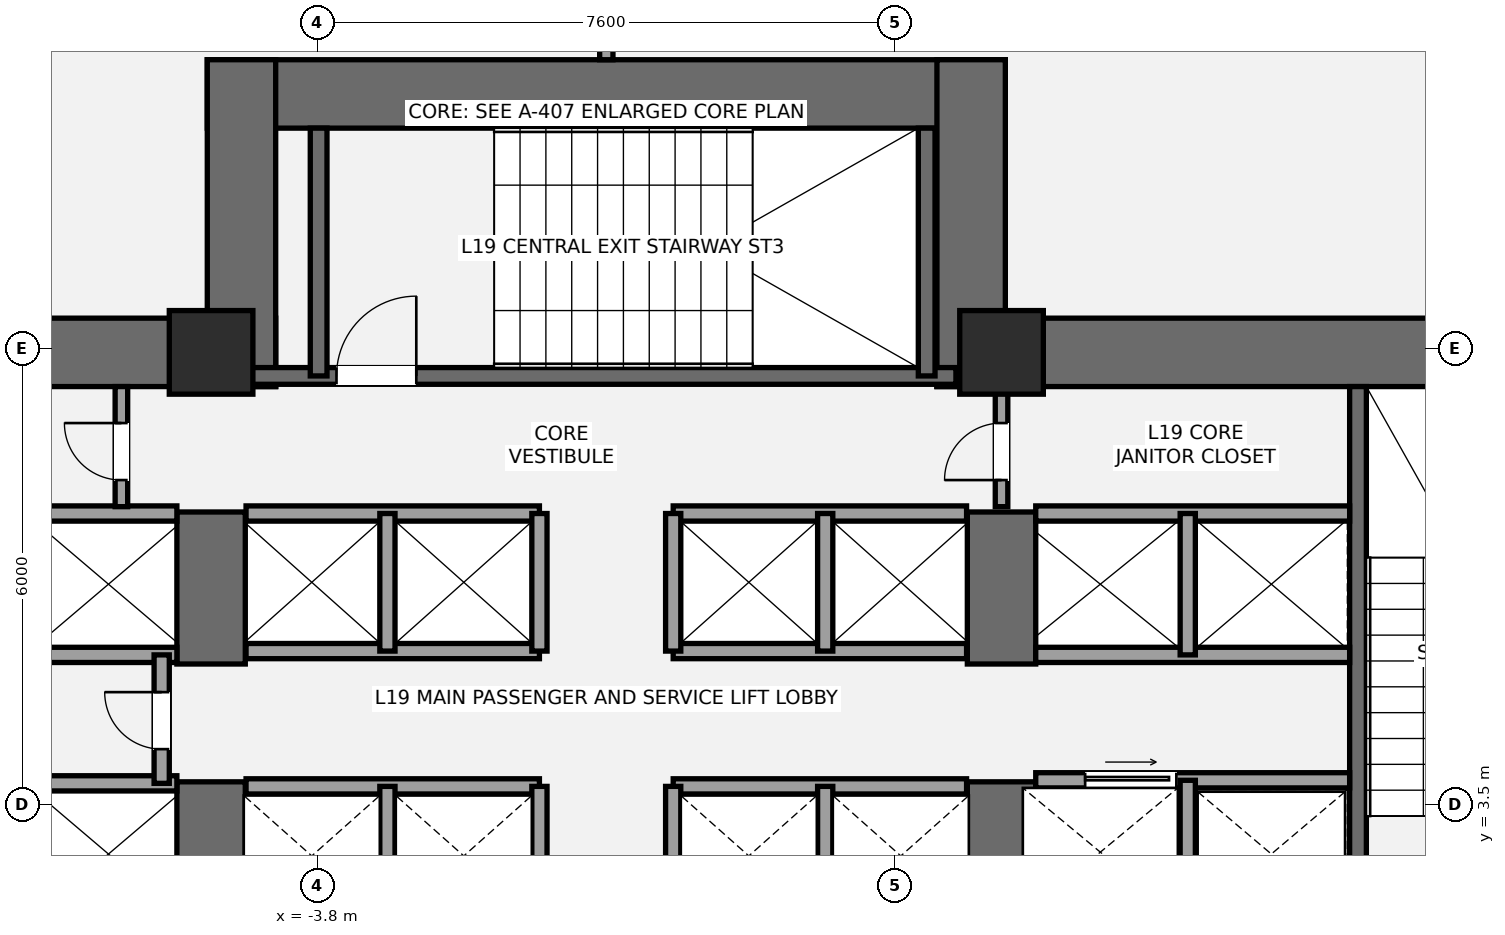
"""IFC4 building model, lengths in metres.
Left out: names, types, materials, properties, quantities, classifications, styles, units other than length and angle.
Written with IfcOpenShell. Run it as: python <this file> out.ifc"""

import sys

from ifc_helpers import new_model, si_unit, direction, frame, frame_2d, origin, origin_2d, place, context, subcontext, project, spatial, rectangle, extrude, element, fill, save


model = new_model("IFC4")
c1 = context("Model", 3, precision=1e-05, world=origin(), true_north=direction((0.0, 1.0)))
c2 = subcontext(c1, "Body", "Model", "MODEL_VIEW")
j1 = project(units=[si_unit("LENGTHUNIT", "METRE"), si_unit("PLANEANGLEUNIT", "RADIAN")], contexts=[c1])
p1 = place(None, origin())
s1 = spatial("IfcSite", under=j1, at=p1, CompositionType="ELEMENT")
p2 = place(p1, origin())
s2 = spatial("IfcBuilding", under=s1, at=p2, CompositionType="ELEMENT")
p3 = place(p2, frame((0.0, 0.0, 73.8)))
s3 = spatial("IfcBuildingStorey", under=s2, at=p3, CompositionType="ELEMENT", Elevation=73.8)
p4 = place(p3, frame((-14.05, 9.45, 0.0), z_axis=(0.0, 0.0, 1.0), x_axis=(1.0, 0.0, 0.0)))
e1 = element("IfcWall", 1, at=p4, inside=s3, PredefinedType="SHEAR", context=c2, shape_type="SweptSolid", body=[
    extrude(rectangle(XDim=9.7, YDim=0.9, at=frame_2d((4.85, 0.0))), origin(), (0.0, 0.0, 1.0), 3.6),
])
p5 = place(p3, frame((-5.2, 0.95, 0.0), z_axis=(0.0, 0.0, 1.0), x_axis=(0.0, 1.0, 0.0)))
e2 = element("IfcWall", 2, at=p5, inside=s3, PredefinedType="SHEAR", context=c2, shape_type="SweptSolid", body=[
    extrude(rectangle(XDim=2.85, YDim=0.9, at=frame_2d((1.425, 0.0))), origin(), (0.0, 0.0, 1.0), 3.6),
])
p6 = place(p3, frame((-5.2, 5.35, 0.0), z_axis=(0.0, 0.0, 1.0), x_axis=(0.0, 1.0, 0.0)))
e3 = element("IfcWall", 3, at=p6, inside=s3, PredefinedType="SHEAR", context=c2, shape_type="SweptSolid", body=[
    extrude(rectangle(XDim=2.0, YDim=0.9, at=frame_2d((1.0, 0.0))), origin(), (0.0, 0.0, 1.0), 3.6),
])
p7 = place(p3, frame((4.35, 9.45, 0.0), z_axis=(0.0, 0.0, 1.0), x_axis=(1.0, 0.0, 0.0)))
e4 = element("IfcWall", 4, at=p7, inside=s3, PredefinedType="SHEAR", context=c2, shape_type="SweptSolid", body=[
    extrude(rectangle(XDim=9.7, YDim=0.9, at=frame_2d((4.85, 0.0))), origin(), (0.0, 0.0, 1.0), 3.6),
])
p8 = place(p3, frame((5.2, 0.95, 0.0), z_axis=(0.0, 0.0, 1.0), x_axis=(0.0, 1.0, 0.0)))
e5 = element("IfcWall", 5, at=p8, inside=s3, PredefinedType="SHEAR", context=c2, shape_type="SweptSolid", body=[
    extrude(rectangle(XDim=2.85, YDim=0.9, at=frame_2d((1.425, 0.0))), origin(), (0.0, 0.0, 1.0), 3.6),
])
p9 = place(p3, frame((5.2, 5.35, 0.0), z_axis=(0.0, 0.0, 1.0), x_axis=(0.0, 1.0, 0.0)))
e6 = element("IfcWall", 6, at=p9, inside=s3, PredefinedType="SHEAR", context=c2, shape_type="SweptSolid", body=[
    extrude(rectangle(XDim=2.0, YDim=0.9, at=frame_2d((1.0, 0.0))), origin(), (0.0, 0.0, 1.0), 3.6),
])
p10 = place(p3, frame((9.89, 1.85, 0.0), z_axis=(0.0, 0.0, 1.0), x_axis=(0.0, 1.0, 0.0)))
e7 = element("IfcWall", 7, at=p10, inside=s3, PredefinedType="SHEAR", context=c2, shape_type="SweptSolid", body=[
    extrude(rectangle(XDim=7.15, YDim=0.22, at=frame_2d((3.575, 0.0))), origin(), (0.0, 0.0, 1.0), 3.6),
])
p11 = place(p3, frame((-5.25, 12.85, 0.0), z_axis=(0.0, 0.0, 1.0), x_axis=(1.0, 0.0, 0.0)))
e8 = element("IfcWall", 8, at=p11, inside=s3, PredefinedType="SHEAR", context=c2, shape_type="SweptSolid", body=[
    extrude(rectangle(XDim=10.5, YDim=0.9, at=frame_2d((5.25, 0.0))), origin(), (0.0, 0.0, 1.0), 3.6),
])
for number, where, z_axis, x_axis in (
    (9, (-4.8, 9.0, 0.0), (0.0, 0.0, 1.0), (0.0, 1.0, 0.0)),
    (10, (4.8, 9.0, 0.0), (0.0, 0.0, 1.0), (0.0, 1.0, 0.0)),
):
    element("IfcWall", number, at=place(p3, frame(where, z_axis=z_axis, x_axis=x_axis)), inside=s3, PredefinedType="SHEAR", context=c2, shape_type="SweptSolid", body=[
        extrude(rectangle(XDim=4.3, YDim=0.9, at=frame_2d((2.15, 0.0))), origin(), (0.0, 0.0, 1.0), 3.6),
    ])
p12 = place(p3, frame((-4.7, 9.14, 0.0), z_axis=(0.0, 0.0, 1.0), x_axis=(1.0, 0.0, 0.0)))
e11 = element("IfcWall", 11, at=p12, inside=s3, PredefinedType="SHEAR", context=c2, shape_type="SweptSolid", body=[
    extrude(rectangle(XDim=9.3, YDim=0.22, at=frame_2d((4.65, 0.0))), origin(), (0.0, 0.0, 1.0), 3.6),
])
p13 = place(p12, frame((1.15, 0.0, 0.0)))
e12 = element("IfcOpeningElement", 12, at=p13, cuts=e11, PredefinedType="OPENING", context=c2, shape_type="SweptSolid", body=[
    extrude(rectangle(XDim=1.05, YDim=2.15, at=frame_2d((0.525, 1.075))), frame((0.0, 0.12, 0.0), z_axis=(0.0, -1.0, 0.0), x_axis=(1.0, 0.0, 0.0)), (0.0, 0.0, 1.0), 0.24),
])
for number, where, z_axis, x_axis in (
    (13, (-3.785, 9.14, 0.0), (0.0, 0.0, 1.0), (0.0, 1.0, 0.0)),
    (14, (4.215, 9.14, 0.0), (0.0, 0.0, 1.0), (0.0, 1.0, 0.0)),
):
    element("IfcWall", number, at=place(p3, frame(where, z_axis=z_axis, x_axis=x_axis)), inside=s3, PredefinedType="SHEAR", context=c2, shape_type="SweptSolid", body=[
        extrude(rectangle(XDim=3.26, YDim=0.22, at=frame_2d((1.63, 0.0))), origin(), (0.0, 0.0, 1.0), 3.6),
    ])
for number, where, z_axis, x_axis in (
    (15, (-5.2, 9.45, 0.0), (0.0, 0.0, 1.0), (1.0, 0.0, 0.0)),
    (16, (5.2, 9.45, 0.0), (0.0, 0.0, 1.0), (1.0, 0.0, 0.0)),
):
    element("IfcColumn", number, at=place(p3, frame(where, z_axis=z_axis, x_axis=x_axis)), inside=s3, PredefinedType="COLUMN", context=c2, shape_type="SweptSolid", body=[
        extrude(rectangle(XDim=1.1, YDim=1.1, at=origin_2d()), origin(), (0.0, 0.0, 1.0), 3.6),
    ])
for number, where, z_axis, x_axis in (
    (17, (-9.78, 3.78, 0.0), (0.0, 0.0, 1.0), (1.0, 0.0, 0.0)),
    (18, (-9.78, 5.47, 0.0), (0.0, 0.0, 1.0), (1.0, 0.0, 0.0)),
    (19, (-9.78, 7.33, 0.0), (0.0, 0.0, 1.0), (1.0, 0.0, 0.0)),
):
    element("IfcWall", number, at=place(p3, frame(where, z_axis=z_axis, x_axis=x_axis)), inside=s3, PredefinedType="SOLIDWALL", context=c2, shape_type="SweptSolid", body=[
        extrude(rectangle(XDim=4.13, YDim=0.2, at=frame_2d((2.065, 0.0))), origin(), (0.0, 0.0, 1.0), 3.36),
    ])
p14 = place(p3, frame((-5.85, 3.78, 0.0), z_axis=(0.0, 0.0, 1.0), x_axis=(0.0, 1.0, 0.0)))
e20 = element("IfcWall", 20, at=p14, inside=s3, PredefinedType="SOLIDWALL", context=c2, shape_type="SweptSolid", body=[
    extrude(rectangle(XDim=1.69, YDim=0.2, at=frame_2d((0.845, 0.0))), origin(), (0.0, 0.0, 1.0), 3.36),
])
p15 = place(p14, frame((0.45, 0.0, 0.0)))
e21 = element("IfcOpeningElement", 21, at=p15, cuts=e20, PredefinedType="OPENING", context=c2, shape_type="SweptSolid", body=[
    extrude(rectangle(XDim=0.75, YDim=2.1, at=frame_2d((0.375, 1.05))), frame((0.0, 0.11, 0.0), z_axis=(0.0, -1.0, 0.0), x_axis=(1.0, 0.0, 0.0)), (0.0, 0.0, 1.0), 0.22),
])
p16 = place(p3, frame((5.65, 3.82, 0.0), z_axis=(0.0, 0.0, 1.0), x_axis=(1.0, 0.0, 0.0)))
e22 = element("IfcWall", 22, at=p16, inside=s3, PredefinedType="SOLIDWALL", context=c2, shape_type="SweptSolid", body=[
    extrude(rectangle(XDim=4.13, YDim=0.2, at=frame_2d((2.065, 0.0))), origin(), (0.0, 0.0, 1.0), 3.36),
])
p17 = place(p16, frame((0.65, 0.0, 0.0)))
e23 = element("IfcOpeningElement", 23, at=p17, cuts=e22, PredefinedType="OPENING", context=c2, shape_type="SweptSolid", body=[
    extrude(rectangle(XDim=1.2, YDim=2.2, at=frame_2d((0.6, 1.1))), frame((0.0, 0.11, 0.0), z_axis=(0.0, -1.0, 0.0), x_axis=(1.0, 0.0, 0.0)), (0.0, 0.0, 1.0), 0.22),
])
p18 = place(p3, frame((7.65, 1.85, 0.0), z_axis=(0.0, 0.0, 1.0), x_axis=(0.0, 1.0, 0.0)))
e24 = element("IfcWall", 24, at=p18, inside=s3, PredefinedType="SOLIDWALL", context=c2, shape_type="SweptSolid", body=[
    extrude(rectangle(XDim=1.97, YDim=0.2, at=frame_2d((0.985, 0.0))), origin(), (0.0, 0.0, 1.0), 3.36),
])
for number, where, z_axis, x_axis in (
    (25, (5.65, 5.47, 0.0), (0.0, 0.0, 1.0), (1.0, 0.0, 0.0)),
    (26, (5.65, 7.33, 0.0), (0.0, 0.0, 1.0), (1.0, 0.0, 0.0)),
):
    element("IfcWall", number, at=place(p3, frame(where, z_axis=z_axis, x_axis=x_axis)), inside=s3, PredefinedType="SOLIDWALL", context=c2, shape_type="SweptSolid", body=[
        extrude(rectangle(XDim=4.13, YDim=0.2, at=frame_2d((2.065, 0.0))), origin(), (0.0, 0.0, 1.0), 3.36),
    ])
p19 = place(p3, frame((7.65, 5.47, 0.0), z_axis=(0.0, 0.0, 1.0), x_axis=(0.0, 1.0, 0.0)))
e27 = element("IfcWall", 27, at=p19, inside=s3, PredefinedType="SOLIDWALL", context=c2, shape_type="SweptSolid", body=[
    extrude(rectangle(XDim=1.86, YDim=0.2, at=frame_2d((0.93, 0.0))), origin(), (0.0, 0.0, 1.0), 3.36),
])
for number, where, z_axis, x_axis in (
    (28, (-4.74, 3.74, 0.0), (0.0, 0.0, 1.0), (1.0, 0.0, 0.0)),
    (29, (0.88, 3.74, 0.0), (0.0, 0.0, 1.0), (1.0, 0.0, 0.0)),
):
    element("IfcWall", number, at=place(p3, frame(where, z_axis=z_axis, x_axis=x_axis)), inside=s3, PredefinedType="SOLIDWALL", context=c2, shape_type="SweptSolid", body=[
        extrude(rectangle(XDim=3.86, YDim=0.2, at=frame_2d((1.93, 0.0))), origin(), (0.0, 0.0, 1.0), 3.36),
    ])
for number, where, z_axis, x_axis in (
    (30, (-2.88, 1.92, 0.0), (0.0, 0.0, 1.0), (0.0, 1.0, 0.0)),
    (31, (2.88, 1.92, 0.0), (0.0, 0.0, 1.0), (0.0, 1.0, 0.0)),
    (32, (-0.88, 1.92, 0.0), (0.0, 0.0, 1.0), (0.0, 1.0, 0.0)),
    (33, (0.88, 1.92, 0.0), (0.0, 0.0, 1.0), (0.0, 1.0, 0.0)),
):
    element("IfcWall", number, at=place(p3, frame(where, z_axis=z_axis, x_axis=x_axis)), inside=s3, PredefinedType="SOLIDWALL", context=c2, shape_type="SweptSolid", body=[
        extrude(rectangle(XDim=1.82, YDim=0.2, at=frame_2d((0.91, 0.0))), origin(), (0.0, 0.0, 1.0), 3.36),
    ])
for number, where, z_axis, x_axis in (
    (34, (-4.74, 5.52, 0.0), (0.0, 0.0, 1.0), (1.0, 0.0, 0.0)),
    (35, (0.88, 5.52, 0.0), (0.0, 0.0, 1.0), (1.0, 0.0, 0.0)),
    (36, (-4.74, 7.33, 0.0), (0.0, 0.0, 1.0), (1.0, 0.0, 0.0)),
    (37, (0.88, 7.33, 0.0), (0.0, 0.0, 1.0), (1.0, 0.0, 0.0)),
):
    element("IfcWall", number, at=place(p3, frame(where, z_axis=z_axis, x_axis=x_axis)), inside=s3, PredefinedType="SOLIDWALL", context=c2, shape_type="SweptSolid", body=[
        extrude(rectangle(XDim=3.86, YDim=0.2, at=frame_2d((1.93, 0.0))), origin(), (0.0, 0.0, 1.0), 3.36),
    ])
for number, where, z_axis, x_axis in (
    (38, (-2.88, 5.52, 0.0), (0.0, 0.0, 1.0), (0.0, 1.0, 0.0)),
    (39, (2.88, 5.52, 0.0), (0.0, 0.0, 1.0), (0.0, 1.0, 0.0)),
    (40, (-0.88, 5.52, 0.0), (0.0, 0.0, 1.0), (0.0, 1.0, 0.0)),
    (41, (0.88, 5.52, 0.0), (0.0, 0.0, 1.0), (0.0, 1.0, 0.0)),
):
    element("IfcWall", number, at=place(p3, frame(where, z_axis=z_axis, x_axis=x_axis)), inside=s3, PredefinedType="SOLIDWALL", context=c2, shape_type="SweptSolid", body=[
        extrude(rectangle(XDim=1.81, YDim=0.2, at=frame_2d((0.905, 0.0))), origin(), (0.0, 0.0, 1.0), 3.36),
    ])
p20 = place(p3, frame((-6.38, 7.42, 0.0), z_axis=(0.0, 0.0, 1.0), x_axis=(0.0, 1.0, 0.0)))
e42 = element("IfcWall", 42, at=p20, inside=s3, PredefinedType="PARTITIONING", context=c2, shape_type="SweptSolid", body=[
    extrude(rectangle(XDim=1.58, YDim=0.165, at=frame_2d((0.79, 0.0))), origin(), (0.0, 0.0, 1.0), 3.36),
])
p21 = place(p20, frame((0.35, 0.0, 0.0)))
e43 = element("IfcOpeningElement", 43, at=p21, cuts=e42, PredefinedType="OPENING", context=c2, shape_type="SweptSolid", body=[
    extrude(rectangle(XDim=0.75, YDim=2.1, at=frame_2d((0.375, 1.05))), frame((0.0, 0.093, 0.0), z_axis=(0.0, -1.0, 0.0), x_axis=(1.0, 0.0, 0.0)), (0.0, 0.0, 1.0), 0.185),
])
p22 = place(p3, frame((5.2, 7.42, 0.0), z_axis=(0.0, 0.0, 1.0), x_axis=(0.0, 1.0, 0.0)))
e44 = element("IfcWall", 44, at=p22, inside=s3, PredefinedType="PARTITIONING", context=c2, shape_type="SweptSolid", body=[
    extrude(rectangle(XDim=1.58, YDim=0.165, at=frame_2d((0.79, 0.0))), origin(), (0.0, 0.0, 1.0), 3.36),
])
p23 = place(p22, frame((0.35, 0.0, 0.0)))
e45 = element("IfcOpeningElement", 45, at=p23, cuts=e44, PredefinedType="OPENING", context=c2, shape_type="SweptSolid", body=[
    extrude(rectangle(XDim=0.75, YDim=2.1, at=frame_2d((0.375, 1.05))), frame((0.0, 0.093, 0.0), z_axis=(0.0, -1.0, 0.0), x_axis=(1.0, 0.0, 0.0)), (0.0, 0.0, 1.0), 0.185),
])
p24 = place(p3, frame((0.0, 13.3, 0.0), z_axis=(0.0, 0.0, 1.0), x_axis=(0.0, 1.0, 0.0)))
e46 = element("IfcWall", 46, at=p24, inside=s3, PredefinedType="PARTITIONING", context=c2, shape_type="SweptSolid", body=[
    extrude(rectangle(XDim=6.597, YDim=0.175, at=frame_2d((3.299, 0.0))), origin(), (0.0, 0.0, 1.0), 3.36),
])
p25 = place(p13, origin())
e47 = element("IfcDoor", 47, at=p25, inside=s3, OperationType="SINGLE_SWING_RIGHT", PredefinedType="DOOR", context=c2, shape_type="SweptSolid", body=[
    extrude(rectangle(XDim=1.05, YDim=2.15, at=frame_2d((0.525, 1.075))), frame((0.0, 0.025, 0.0), z_axis=(0.0, -1.0, 0.0), x_axis=(1.0, 0.0, 0.0)), (0.0, 0.0, 1.0), 0.05),
])
fill(e12, e47)
p26 = place(p15, origin())
e48 = element("IfcDoor", 48, at=p26, inside=s3, OperationType="SINGLE_SWING_RIGHT", PredefinedType="DOOR", context=c2, shape_type="SweptSolid", body=[
    extrude(rectangle(XDim=0.75, YDim=2.1, at=frame_2d((0.375, 1.05))), frame((0.0, 0.025, 0.0), z_axis=(0.0, -1.0, 0.0), x_axis=(1.0, 0.0, 0.0)), (0.0, 0.0, 1.0), 0.05),
])
fill(e21, e48)
p27 = place(p17, origin())
e49 = element("IfcDoor", 49, at=p27, inside=s3, OperationType="SLIDING_TO_RIGHT", PredefinedType="DOOR", context=c2, shape_type="SweptSolid", body=[
    extrude(rectangle(XDim=1.2, YDim=2.2, at=frame_2d((0.6, 1.1))), frame((0.0, 0.025, 0.0), z_axis=(0.0, -1.0, 0.0), x_axis=(1.0, 0.0, 0.0)), (0.0, 0.0, 1.0), 0.05),
])
fill(e23, e49)
p28 = place(p21, origin())
e50 = element("IfcDoor", 50, at=p28, inside=s3, OperationType="SINGLE_SWING_RIGHT", PredefinedType="DOOR", context=c2, shape_type="SweptSolid", body=[
    extrude(rectangle(XDim=0.75, YDim=2.1, at=frame_2d((0.375, 1.05))), frame((0.0, 0.025, 0.0), z_axis=(0.0, -1.0, 0.0), x_axis=(1.0, 0.0, 0.0)), (0.0, 0.0, 1.0), 0.05),
])
fill(e43, e50)
p29 = place(p23, origin())
e51 = element("IfcDoor", 51, at=p29, inside=s3, OperationType="SINGLE_SWING_LEFT", PredefinedType="DOOR", context=c2, shape_type="SweptSolid", body=[
    extrude(rectangle(XDim=0.75, YDim=2.1, at=frame_2d((0.375, 1.05))), frame((0.0, 0.025, 0.0), z_axis=(0.0, -1.0, 0.0), x_axis=(1.0, 0.0, 0.0)), (0.0, 0.0, 1.0), 0.05),
])
fill(e45, e51)
save(model, sys.argv[1])
